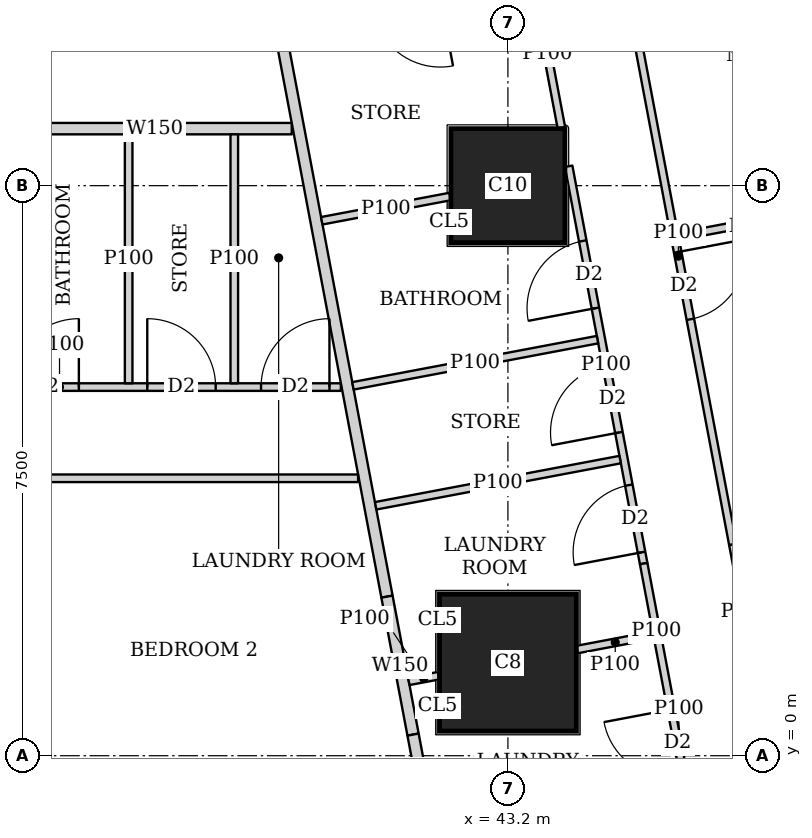
"""IFC4 building model, lengths in metres.
Left out: names, types, materials, properties, quantities, classifications, styles, units other than length and angle.
Written with IfcOpenShell. Run it as: python <this file> out.ifc"""

import sys

from ifc_helpers import new_model, si_unit, direction, frame, frame_2d, origin, origin_2d, place, context, subcontext, project, spatial, rectangle, extrude, element, fill, save


model = new_model("IFC4")
c1 = context("Model", 3, precision=1e-05, world=origin(), true_north=direction((0.0, 1.0)))
c2 = subcontext(c1, "Body", "Model", "MODEL_VIEW")
j1 = project(units=[si_unit("LENGTHUNIT", "METRE"), si_unit("PLANEANGLEUNIT", "RADIAN")], contexts=[c1])
p1 = place(None, origin())
s1 = spatial("IfcSite", under=j1, at=p1, CompositionType="ELEMENT")
p2 = place(p1, origin())
s2 = spatial("IfcBuilding", under=s1, at=p2, CompositionType="ELEMENT")
p3 = place(p2, frame((0.0, 0.0, 169.55)))
s3 = spatial("IfcBuildingStorey", under=s2, at=p3, CompositionType="ELEMENT", Elevation=169.55)
p4 = place(p3, frame((43.2, 1.225, 0.0), z_axis=(0.0, 0.0, 1.0), x_axis=(1.0, 0.0, 0.0)))
e1 = element("IfcColumn", 1, at=p4, inside=s3, PredefinedType="COLUMN", context=c2, shape_type="SweptSolid", body=[
    extrude(rectangle(XDim=1.8, YDim=1.8, at=origin_2d()), origin(), (0.0, 0.0, 1.0), 3.75),
])
p5 = place(p3, frame((43.2, 7.5, 0.0), z_axis=(0.0, 0.0, 1.0), x_axis=(1.0, 0.0, 0.0)))
e2 = element("IfcColumn", 2, at=p5, inside=s3, PredefinedType="COLUMN", context=c2, shape_type="SweptSolid", body=[
    extrude(rectangle(XDim=1.5, YDim=1.5, at=origin_2d()), origin(), (0.0, 0.0, 1.0), 3.75),
])
p6 = place(p3, frame((50.653, 2.703, 0.0), z_axis=(0.0, 0.0, 1.0), x_axis=(-0.185612026696, 0.982623109613, 0.0)))
e3 = element("IfcWall", 3, at=p6, inside=s3, PredefinedType="SOLIDWALL", context=c2, shape_type="SweptSolid", body=[
    extrude(rectangle(XDim=41.393, YDim=0.2, at=frame_2d((20.697, 0.0))), origin(), (0.0, 0.0, 1.0), 3.5),
])
p7 = place(p6, frame((1.633, 0.0, 0.9)))
e4 = element("IfcOpeningElement", 4, at=p7, cuts=e3, PredefinedType="OPENING", context=c2, shape_type="SweptSolid", body=[
    extrude(rectangle(XDim=1.8, YDim=1.5, at=frame_2d((0.9, 0.75))), frame((0.0, 0.11, 0.0), z_axis=(0.0, -1.0, 0.0), x_axis=(1.0, 0.0, 0.0)), (0.0, 0.0, 1.0), 0.22),
])
p8 = place(p6, frame((6.032, 0.0, 0.9)))
e5 = element("IfcOpeningElement", 5, at=p8, cuts=e3, PredefinedType="OPENING", context=c2, shape_type="SweptSolid", body=[
    extrude(rectangle(XDim=1.8, YDim=1.5, at=frame_2d((0.9, 0.75))), frame((0.0, 0.11, 0.0), z_axis=(0.0, -1.0, 0.0), x_axis=(1.0, 0.0, 0.0)), (0.0, 0.0, 1.0), 0.22),
])
p9 = place(p6, frame((9.848, 0.0, 0.9)))
e6 = element("IfcOpeningElement", 6, at=p9, cuts=e3, PredefinedType="OPENING", context=c2, shape_type="SweptSolid", body=[
    extrude(rectangle(XDim=1.8, YDim=1.5, at=frame_2d((0.9, 0.75))), frame((0.0, 0.11, 0.0), z_axis=(0.0, -1.0, 0.0), x_axis=(1.0, 0.0, 0.0)), (0.0, 0.0, 1.0), 0.22),
])
p10 = place(p6, frame((13.664, 0.0, 0.9)))
e7 = element("IfcOpeningElement", 7, at=p10, cuts=e3, PredefinedType="OPENING", context=c2, shape_type="SweptSolid", body=[
    extrude(rectangle(XDim=1.8, YDim=1.5, at=frame_2d((0.9, 0.75))), frame((0.0, 0.11, 0.0), z_axis=(0.0, -1.0, 0.0), x_axis=(1.0, 0.0, 0.0)), (0.0, 0.0, 1.0), 0.22),
])
p11 = place(p6, frame((17.481, 0.0, 0.9)))
e8 = element("IfcOpeningElement", 8, at=p11, cuts=e3, PredefinedType="OPENING", context=c2, shape_type="SweptSolid", body=[
    extrude(rectangle(XDim=1.8, YDim=1.5, at=frame_2d((0.9, 0.75))), frame((0.0, 0.11, 0.0), z_axis=(0.0, -1.0, 0.0), x_axis=(1.0, 0.0, 0.0)), (0.0, 0.0, 1.0), 0.22),
])
p12 = place(p6, frame((21.297, 0.0, 0.9)))
e9 = element("IfcOpeningElement", 9, at=p12, cuts=e3, PredefinedType="OPENING", context=c2, shape_type="SweptSolid", body=[
    extrude(rectangle(XDim=1.8, YDim=1.5, at=frame_2d((0.9, 0.75))), frame((0.0, 0.11, 0.0), z_axis=(0.0, -1.0, 0.0), x_axis=(1.0, 0.0, 0.0)), (0.0, 0.0, 1.0), 0.22),
])
p13 = place(p6, frame((25.113, 0.0, 0.9)))
e10 = element("IfcOpeningElement", 10, at=p13, cuts=e3, PredefinedType="OPENING", context=c2, shape_type="SweptSolid", body=[
    extrude(rectangle(XDim=1.8, YDim=1.5, at=frame_2d((0.9, 0.75))), frame((0.0, 0.11, 0.0), z_axis=(0.0, -1.0, 0.0), x_axis=(1.0, 0.0, 0.0)), (0.0, 0.0, 1.0), 0.22),
])
p14 = place(p6, frame((28.93, 0.0, 0.9)))
e11 = element("IfcOpeningElement", 11, at=p14, cuts=e3, PredefinedType="OPENING", context=c2, shape_type="SweptSolid", body=[
    extrude(rectangle(XDim=1.8, YDim=1.5, at=frame_2d((0.9, 0.75))), frame((0.0, 0.11, 0.0), z_axis=(0.0, -1.0, 0.0), x_axis=(1.0, 0.0, 0.0)), (0.0, 0.0, 1.0), 0.22),
])
p15 = place(p6, frame((32.746, 0.0, 0.9)))
e12 = element("IfcOpeningElement", 12, at=p15, cuts=e3, PredefinedType="OPENING", context=c2, shape_type="SweptSolid", body=[
    extrude(rectangle(XDim=1.8, YDim=1.5, at=frame_2d((0.9, 0.75))), frame((0.0, 0.11, 0.0), z_axis=(0.0, -1.0, 0.0), x_axis=(1.0, 0.0, 0.0)), (0.0, 0.0, 1.0), 0.22),
])
p16 = place(p6, frame((36.481, 0.0, 0.9)))
e13 = element("IfcOpeningElement", 13, at=p16, cuts=e3, PredefinedType="OPENING", context=c2, shape_type="SweptSolid", body=[
    extrude(rectangle(XDim=1.8, YDim=1.5, at=frame_2d((0.9, 0.75))), frame((0.0, 0.11, 0.0), z_axis=(0.0, -1.0, 0.0), x_axis=(1.0, 0.0, 0.0)), (0.0, 0.0, 1.0), 0.22),
])
p17 = place(p3, frame((40.356, 8.25, 0.0), z_axis=(0.0, 0.0, 1.0), x_axis=(-1.0, 0.0, 0.0)))
e14 = element("IfcWall", 14, at=p17, inside=s3, PredefinedType="SOLIDWALL", context=c2, shape_type="SweptSolid", body=[
    extrude(rectangle(XDim=3.605, YDim=0.15, at=frame_2d((1.802, 0.0))), origin(), (0.0, 0.0, 1.0), 3.5),
])
p18 = place(p3, frame((33.877, 43.029, 0.0), z_axis=(0.0, 0.0, 1.0), x_axis=(0.185596841028, -0.98262597798, 0.0)))
e15 = element("IfcWall", 15, at=p18, inside=s3, PredefinedType="SOLIDWALL", context=c2, shape_type="SweptSolid", body=[
    extrude(rectangle(XDim=41.66, YDim=0.15, at=frame_2d((20.83, 0.0))), origin(), (0.0, 0.0, 1.0), 2.5),
])
p19 = place(p18, frame((8.63, 0.0, 0.0)))
e16 = element("IfcOpeningElement", 16, at=p19, cuts=e15, PredefinedType="OPENING", context=c2, shape_type="SweptSolid", body=[
    extrude(rectangle(XDim=1.0, YDim=2.1, at=frame_2d((0.5, 1.05))), frame((0.0, 0.085, 0.0), z_axis=(0.0, -1.0, 0.0), x_axis=(1.0, 0.0, 0.0)), (0.0, 0.0, 1.0), 0.17),
])
p20 = place(p18, frame((13.841, 0.0, 0.0)))
e17 = element("IfcOpeningElement", 17, at=p20, cuts=e15, PredefinedType="OPENING", context=c2, shape_type="SweptSolid", body=[
    extrude(rectangle(XDim=1.0, YDim=2.1, at=frame_2d((0.5, 1.05))), frame((0.0, 0.085, 0.0), z_axis=(0.0, -1.0, 0.0), x_axis=(1.0, 0.0, 0.0)), (0.0, 0.0, 1.0), 0.17),
])
p21 = place(p18, frame((21.474, 0.0, 0.0)))
e18 = element("IfcOpeningElement", 18, at=p21, cuts=e15, PredefinedType="OPENING", context=c2, shape_type="SweptSolid", body=[
    extrude(rectangle(XDim=1.0, YDim=2.1, at=frame_2d((0.5, 1.05))), frame((0.0, 0.085, 0.0), z_axis=(0.0, -1.0, 0.0), x_axis=(1.0, 0.0, 0.0)), (0.0, 0.0, 1.0), 0.17),
])
p22 = place(p18, frame((30.4, 0.0, 0.0)))
e19 = element("IfcOpeningElement", 19, at=p22, cuts=e15, PredefinedType="OPENING", context=c2, shape_type="SweptSolid", body=[
    extrude(rectangle(XDim=1.0, YDim=2.1, at=frame_2d((0.5, 1.05))), frame((0.0, 0.085, 0.0), z_axis=(0.0, -1.0, 0.0), x_axis=(1.0, 0.0, 0.0)), (0.0, 0.0, 1.0), 0.17),
])
p23 = place(p18, frame((32.288, 0.0, 0.0)))
e20 = element("IfcOpeningElement", 20, at=p23, cuts=e15, PredefinedType="OPENING", context=c2, shape_type="SweptSolid", body=[
    extrude(rectangle(XDim=1.0, YDim=2.1, at=frame_2d((0.5, 1.05))), frame((0.0, 0.085, 0.0), z_axis=(0.0, -1.0, 0.0), x_axis=(1.0, 0.0, 0.0)), (0.0, 0.0, 1.0), 0.17),
])
p24 = place(p3, frame((41.609, 2.093, 0.0), z_axis=(0.0, 0.0, 1.0), x_axis=(0.185708872674, -0.982604811005, 0.0)))
e21 = element("IfcWall", 21, at=p24, inside=s3, PredefinedType="SOLIDWALL", context=c2, shape_type="SweptSolid", body=[
    extrude(rectangle(XDim=1.847, YDim=0.15, at=frame_2d((0.924, 0.0))), origin(), (0.0, 0.0, 1.0), 2.1),
])
p25 = place(p3, frame((41.952, 0.278, 0.0), z_axis=(0.0, 0.0, 1.0), x_axis=(0.185365466984, -0.982669651332, 0.0)))
e22 = element("IfcWall", 22, at=p25, inside=s3, PredefinedType="SOLIDWALL", context=c2, shape_type="SweptSolid", body=[
    extrude(rectangle(XDim=0.944, YDim=0.15, at=frame_2d((0.472, 0.0))), origin(), (0.0, 0.0, 1.0), 3.5),
])
p26 = place(p3, frame((41.229, 3.65, 0.0), z_axis=(0.0, 0.0, 1.0), x_axis=(-1.0, 0.0, 0.0)))
e23 = element("IfcWall", 23, at=p26, inside=s3, PredefinedType="PARTITIONING", context=c2, shape_type="SweptSolid", body=[
    extrude(rectangle(XDim=8.829, YDim=0.1, at=frame_2d((4.415, 0.0))), origin(), (0.0, 0.0, 1.0), 3.5),
])
p27 = place(p26, frame((6.53, 0.0, 0.0)))
e24 = element("IfcOpeningElement", 24, at=p27, cuts=e23, PredefinedType="OPENING", context=c2, shape_type="SweptSolid", body=[
    extrude(rectangle(XDim=0.9, YDim=2.1, at=frame_2d((0.45, 1.05))), frame((0.0, 0.06, 0.0), z_axis=(0.0, -1.0, 0.0), x_axis=(1.0, 0.0, 0.0)), (0.0, 0.0, 1.0), 0.12),
])
p28 = place(p26, frame((4.129, 0.0, 0.0)))
e25 = element("IfcOpeningElement", 25, at=p28, cuts=e23, PredefinedType="OPENING", context=c2, shape_type="SweptSolid", body=[
    extrude(rectangle(XDim=0.9, YDim=2.1, at=frame_2d((0.45, 1.05))), frame((0.0, 0.06, 0.0), z_axis=(0.0, -1.0, 0.0), x_axis=(1.0, 0.0, 0.0)), (0.0, 0.0, 1.0), 0.12),
])
p29 = place(p3, frame((41.002, 4.85, 0.0), z_axis=(0.0, 0.0, 1.0), x_axis=(-1.0, 0.0, 0.0)))
e26 = element("IfcWall", 26, at=p29, inside=s3, PredefinedType="PARTITIONING", context=c2, shape_type="SweptSolid", body=[
    extrude(rectangle(XDim=7.403, YDim=0.1, at=frame_2d((3.701, 0.0))), origin(), (0.0, 0.0, 1.0), 3.5),
])
p30 = place(p29, frame((5.753, 0.0, 0.0)))
e27 = element("IfcOpeningElement", 27, at=p30, cuts=e26, PredefinedType="OPENING", context=c2, shape_type="SweptSolid", body=[
    extrude(rectangle(XDim=0.9, YDim=2.1, at=frame_2d((0.45, 1.05))), frame((0.0, 0.06, 0.0), z_axis=(0.0, -1.0, 0.0), x_axis=(1.0, 0.0, 0.0)), (0.0, 0.0, 1.0), 0.12),
])
p31 = place(p29, frame((3.447, 0.0, 0.0)))
e28 = element("IfcOpeningElement", 28, at=p31, cuts=e26, PredefinedType="OPENING", context=c2, shape_type="SweptSolid", body=[
    extrude(rectangle(XDim=0.9, YDim=2.1, at=frame_2d((0.45, 1.05))), frame((0.0, 0.06, 0.0), z_axis=(0.0, -1.0, 0.0), x_axis=(1.0, 0.0, 0.0)), (0.0, 0.0, 1.0), 0.12),
])
p32 = place(p29, frame((0.15, 0.0, 0.0)))
e29 = element("IfcOpeningElement", 29, at=p32, cuts=e26, PredefinedType="OPENING", context=c2, shape_type="SweptSolid", body=[
    extrude(rectangle(XDim=0.9, YDim=2.1, at=frame_2d((0.45, 1.05))), frame((0.0, 0.06, 0.0), z_axis=(0.0, -1.0, 0.0), x_axis=(1.0, 0.0, 0.0)), (0.0, 0.0, 1.0), 0.12),
])
p33 = place(p29, frame((1.647, 0.0, 0.0)))
e30 = element("IfcOpeningElement", 30, at=p33, cuts=e26, PredefinedType="OPENING", context=c2, shape_type="SweptSolid", body=[
    extrude(rectangle(XDim=0.9, YDim=2.1, at=frame_2d((0.45, 1.05))), frame((0.0, 0.06, 0.0), z_axis=(0.0, -1.0, 0.0), x_axis=(1.0, 0.0, 0.0)), (0.0, 0.0, 1.0), 0.12),
])
for number, where, z_axis, x_axis in (
    (31, (39.6, 4.9, 0.0), (0.0, 0.0, 1.0), (0.0, 1.0, 0.0)),
    (32, (38.21, 4.9, 0.0), (0.0, 0.0, 1.0), (0.0, 1.0, 0.0)),
):
    element("IfcWall", number, at=place(p3, frame(where, z_axis=z_axis, x_axis=x_axis)), inside=s3, PredefinedType="PARTITIONING", context=c2, shape_type="SweptSolid", body=[
        extrude(rectangle(XDim=3.275, YDim=0.1, at=frame_2d((1.638, 0.0))), origin(), (0.0, 0.0, 1.0), 3.5),
    ])
p34 = place(p3, frame((44.727, 10.366, 0.0), z_axis=(0.0, 0.0, 1.0), x_axis=(0.185578957652, -0.982629355595, 0.0)))
e33 = element("IfcWall", 33, at=p34, inside=s3, PredefinedType="PARTITIONING", context=c2, shape_type="SweptSolid", body=[
    extrude(rectangle(XDim=7.721, YDim=0.1, at=frame_2d((3.86, 0.0))), origin(), (0.0, 0.0, 1.0), 3.5),
])
p35 = place(p34, frame((0.151, 0.0, 0.0)))
e34 = element("IfcOpeningElement", 34, at=p35, cuts=e33, PredefinedType="OPENING", context=c2, shape_type="SweptSolid", body=[
    extrude(rectangle(XDim=0.9, YDim=2.1, at=frame_2d((0.45, 1.05))), frame((0.0, 0.06, 0.0), z_axis=(0.0, -1.0, 0.0), x_axis=(1.0, 0.0, 0.0)), (0.0, 0.0, 1.0), 0.12),
])
p36 = place(p34, frame((3.806, 0.0, 0.0)))
e35 = element("IfcOpeningElement", 35, at=p36, cuts=e33, PredefinedType="OPENING", context=c2, shape_type="SweptSolid", body=[
    extrude(rectangle(XDim=0.9, YDim=2.1, at=frame_2d((0.45, 1.05))), frame((0.0, 0.06, 0.0), z_axis=(0.0, -1.0, 0.0), x_axis=(1.0, 0.0, 0.0)), (0.0, 0.0, 1.0), 0.12),
])
p37 = place(p3, frame((46.16, 2.779, 0.0), z_axis=(0.0, 0.0, 1.0), x_axis=(0.18597295662, -0.982554863306, 0.0)))
e36 = element("IfcWall", 36, at=p37, inside=s3, PredefinedType="PARTITIONING", context=c2, shape_type="SweptSolid", body=[
    extrude(rectangle(XDim=1.802, YDim=0.1, at=frame_2d((0.901, 0.0))), origin(), (0.0, 0.0, 1.0), 2.1),
])
p38 = place(p3, frame((43.539, 10.192, 0.0), z_axis=(0.0, 0.0, 1.0), x_axis=(0.18564540894, -0.982616803306, 0.0)))
e37 = element("IfcWall", 37, at=p38, inside=s3, PredefinedType="PARTITIONING", context=c2, shape_type="SweptSolid", body=[
    extrude(rectangle(XDim=1.966, YDim=0.1, at=frame_2d((0.983, 0.0))), origin(), (0.0, 0.0, 1.0), 3.5),
])
p39 = place(p3, frame((43.999, 7.755, 0.0), z_axis=(0.0, 0.0, 1.0), x_axis=(0.185565904578, -0.982631820703, 0.0)))
e38 = element("IfcWall", 38, at=p39, inside=s3, PredefinedType="PARTITIONING", context=c2, shape_type="SweptSolid", body=[
    extrude(rectangle(XDim=5.319, YDim=0.1, at=frame_2d((2.66, 0.0))), origin(), (0.0, 0.0, 1.0), 3.5),
])
p40 = place(p39, frame((1.0, 0.0, 0.0)))
e39 = element("IfcOpeningElement", 39, at=p40, cuts=e38, PredefinedType="OPENING", context=c2, shape_type="SweptSolid", body=[
    extrude(rectangle(XDim=0.9, YDim=2.1, at=frame_2d((0.45, 1.05))), frame((0.0, 0.06, 0.0), z_axis=(0.0, -1.0, 0.0), x_axis=(1.0, 0.0, 0.0)), (0.0, 0.0, 1.0), 0.12),
])
p41 = place(p39, frame((4.269, 0.0, 0.0)))
e40 = element("IfcOpeningElement", 40, at=p41, cuts=e38, PredefinedType="OPENING", context=c2, shape_type="SweptSolid", body=[
    extrude(rectangle(XDim=0.9, YDim=2.1, at=frame_2d((0.45, 1.05))), frame((0.0, 0.06, 0.0), z_axis=(0.0, -1.0, 0.0), x_axis=(1.0, 0.0, 0.0)), (0.0, 0.0, 1.0), 0.12),
])
p42 = place(p39, frame((2.665, 0.0, 0.0)))
e41 = element("IfcOpeningElement", 41, at=p42, cuts=e38, PredefinedType="OPENING", context=c2, shape_type="SweptSolid", body=[
    extrude(rectangle(XDim=0.9, YDim=2.1, at=frame_2d((0.45, 1.05))), frame((0.0, 0.06, 0.0), z_axis=(0.0, -1.0, 0.0), x_axis=(1.0, 0.0, 0.0)), (0.0, 0.0, 1.0), 0.12),
])
p43 = place(p3, frame((44.986, 2.528, 0.0), z_axis=(0.0, 0.0, 1.0), x_axis=(0.18584218627, -0.982579605835, 0.0)))
e42 = element("IfcWall", 42, at=p43, inside=s3, PredefinedType="PARTITIONING", context=c2, shape_type="SweptSolid", body=[
    extrude(rectangle(XDim=1.802, YDim=0.1, at=frame_2d((0.901, 0.0))), origin(), (0.0, 0.0, 1.0), 2.1),
])
p44 = place(p3, frame((45.321, 0.757, 0.0), z_axis=(0.0, 0.0, 1.0), x_axis=(0.185640562635, -0.982617718904, 0.0)))
e43 = element("IfcWall", 43, at=p44, inside=s3, PredefinedType="PARTITIONING", context=c2, shape_type="SweptSolid", body=[
    extrude(rectangle(XDim=1.395, YDim=0.1, at=frame_2d((0.698, 0.0))), origin(), (0.0, 0.0, 1.0), 3.5),
])
p45 = place(p44, frame((0.15, 0.0, 0.0)))
e44 = element("IfcOpeningElement", 44, at=p45, cuts=e43, PredefinedType="OPENING", context=c2, shape_type="SweptSolid", body=[
    extrude(rectangle(XDim=0.9, YDim=2.1, at=frame_2d((0.45, 1.05))), frame((0.0, 0.06, 0.0), z_axis=(0.0, -1.0, 0.0), x_axis=(1.0, 0.0, 0.0)), (0.0, 0.0, 1.0), 0.12),
])
p46 = place(p3, frame((46.82, 7.091, 0.0), z_axis=(0.0, 0.0, 1.0), x_axis=(-0.982689853246, -0.185258339427, 0.0)))
e45 = element("IfcWall", 45, at=p46, inside=s3, PredefinedType="PARTITIONING", context=c2, shape_type="SweptSolid", body=[
    extrude(rectangle(XDim=1.398, YDim=0.1, at=frame_2d((0.699, 0.0))), origin(), (0.0, 0.0, 1.0), 3.5),
])
p47 = place(p3, frame((42.44, 7.357, 0.0), z_axis=(0.0, 0.0, 1.0), x_axis=(-0.982643094077, -0.185506198448, 0.0)))
e46 = element("IfcWall", 46, at=p47, inside=s3, PredefinedType="PARTITIONING", context=c2, shape_type="SweptSolid", body=[
    extrude(rectangle(XDim=1.719, YDim=0.1, at=frame_2d((0.859, 0.0))), origin(), (0.0, 0.0, 1.0), 3.5),
])
p48 = place(p3, frame((45.114, 1.587, 0.0), z_axis=(0.0, 0.0, 1.0), x_axis=(-0.982567886437, -0.185904138047, 0.0)))
e47 = element("IfcWall", 47, at=p48, inside=s3, PredefinedType="PARTITIONING", context=c2, shape_type="SweptSolid", body=[
    extrude(rectangle(XDim=1.022, YDim=0.1, at=frame_2d((0.511, 0.0))), origin(), (0.0, 0.0, 1.0), 2.1),
])
p49 = place(p3, frame((42.29, 1.053, 0.0), z_axis=(0.0, 0.0, 1.0), x_axis=(-0.982830800147, -0.184509127909, 0.0)))
e48 = element("IfcWall", 48, at=p49, inside=s3, PredefinedType="PARTITIONING", context=c2, shape_type="SweptSolid", body=[
    extrude(rectangle(XDim=0.401, YDim=0.1, at=frame_2d((0.2, 0.0))), origin(), (0.0, 0.0, 1.0), 2.1),
])
p50 = place(p3, frame((44.677, 3.896, 0.0), z_axis=(0.0, 0.0, 1.0), x_axis=(-0.982610347627, -0.185679575441, 0.0)))
e49 = element("IfcWall", 49, at=p50, inside=s3, PredefinedType="PARTITIONING", context=c2, shape_type="SweptSolid", body=[
    extrude(rectangle(XDim=3.274, YDim=0.1, at=frame_2d((1.637, 0.0))), origin(), (0.0, 0.0, 1.0), 3.5),
])
p51 = place(p3, frame((44.379, 5.474, 0.0), z_axis=(0.0, 0.0, 1.0), x_axis=(-0.982607026909, -0.185697147715, 0.0)))
e50 = element("IfcWall", 50, at=p51, inside=s3, PredefinedType="PARTITIONING", context=c2, shape_type="SweptSolid", body=[
    extrude(rectangle(XDim=3.275, YDim=0.1, at=frame_2d((1.637, 0.0))), origin(), (0.0, 0.0, 1.0), 3.5),
])
p52 = place(p31, origin())
e51 = element("IfcDoor", 51, at=p52, inside=s3, OperationType="SINGLE_SWING_RIGHT", PredefinedType="DOOR", context=c2, shape_type="SweptSolid", body=[
    extrude(rectangle(XDim=0.9, YDim=2.1, at=frame_2d((0.45, 1.05))), frame((0.0, 0.025, 0.0), z_axis=(0.0, -1.0, 0.0), x_axis=(1.0, 0.0, 0.0)), (0.0, 0.0, 1.0), 0.05),
])
fill(e28, e51)
p53 = place(p32, origin())
e52 = element("IfcDoor", 52, at=p53, inside=s3, OperationType="SINGLE_SWING_RIGHT", PredefinedType="DOOR", context=c2, shape_type="SweptSolid", body=[
    extrude(rectangle(XDim=0.9, YDim=2.1, at=frame_2d((0.45, 1.05))), frame((0.0, 0.025, 0.0), z_axis=(0.0, -1.0, 0.0), x_axis=(1.0, 0.0, 0.0)), (0.0, 0.0, 1.0), 0.05),
])
fill(e29, e52)
p54 = place(p33, origin())
e53 = element("IfcDoor", 53, at=p54, inside=s3, OperationType="SINGLE_SWING_LEFT", PredefinedType="DOOR", context=c2, shape_type="SweptSolid", body=[
    extrude(rectangle(XDim=0.9, YDim=2.1, at=frame_2d((0.45, 1.05))), frame((0.0, 0.025, 0.0), z_axis=(0.0, -1.0, 0.0), x_axis=(1.0, 0.0, 0.0)), (0.0, 0.0, 1.0), 0.05),
])
fill(e30, e53)
p55 = place(p36, origin())
e54 = element("IfcDoor", 54, at=p55, inside=s3, OperationType="SINGLE_SWING_LEFT", PredefinedType="DOOR", context=c2, shape_type="SweptSolid", body=[
    extrude(rectangle(XDim=0.9, YDim=2.1, at=frame_2d((0.45, 1.05))), frame((0.0, 0.025, 0.0), z_axis=(0.0, -1.0, 0.0), x_axis=(1.0, 0.0, 0.0)), (0.0, 0.0, 1.0), 0.05),
])
fill(e35, e54)
p56 = place(p40, origin())
e55 = element("IfcDoor", 55, at=p56, inside=s3, OperationType="SINGLE_SWING_LEFT", PredefinedType="DOOR", context=c2, shape_type="SweptSolid", body=[
    extrude(rectangle(XDim=0.9, YDim=2.1, at=frame_2d((0.45, 1.05))), frame((0.0, 0.025, 0.0), z_axis=(0.0, -1.0, 0.0), x_axis=(1.0, 0.0, 0.0)), (0.0, 0.0, 1.0), 0.05),
])
fill(e39, e55)
p57 = place(p41, origin())
e56 = element("IfcDoor", 56, at=p57, inside=s3, OperationType="SINGLE_SWING_LEFT", PredefinedType="DOOR", context=c2, shape_type="SweptSolid", body=[
    extrude(rectangle(XDim=0.9, YDim=2.1, at=frame_2d((0.45, 1.05))), frame((0.0, 0.025, 0.0), z_axis=(0.0, -1.0, 0.0), x_axis=(1.0, 0.0, 0.0)), (0.0, 0.0, 1.0), 0.05),
])
fill(e40, e56)
p58 = place(p45, origin())
e57 = element("IfcDoor", 57, at=p58, inside=s3, OperationType="SINGLE_SWING_RIGHT", PredefinedType="DOOR", context=c2, shape_type="SweptSolid", body=[
    extrude(rectangle(XDim=0.9, YDim=2.1, at=frame_2d((0.45, 1.05))), frame((0.0, 0.025, 0.0), z_axis=(0.0, -1.0, 0.0), x_axis=(1.0, 0.0, 0.0)), (0.0, 0.0, 1.0), 0.05),
])
fill(e44, e57)
p59 = place(p42, origin())
e58 = element("IfcDoor", 58, at=p59, inside=s3, OperationType="SINGLE_SWING_LEFT", PredefinedType="DOOR", context=c2, shape_type="SweptSolid", body=[
    extrude(rectangle(XDim=0.9, YDim=2.1, at=frame_2d((0.45, 1.05))), frame((0.0, 0.025, 0.0), z_axis=(0.0, -1.0, 0.0), x_axis=(1.0, 0.0, 0.0)), (0.0, 0.0, 1.0), 0.05),
])
fill(e41, e58)
save(model, sys.argv[1])
